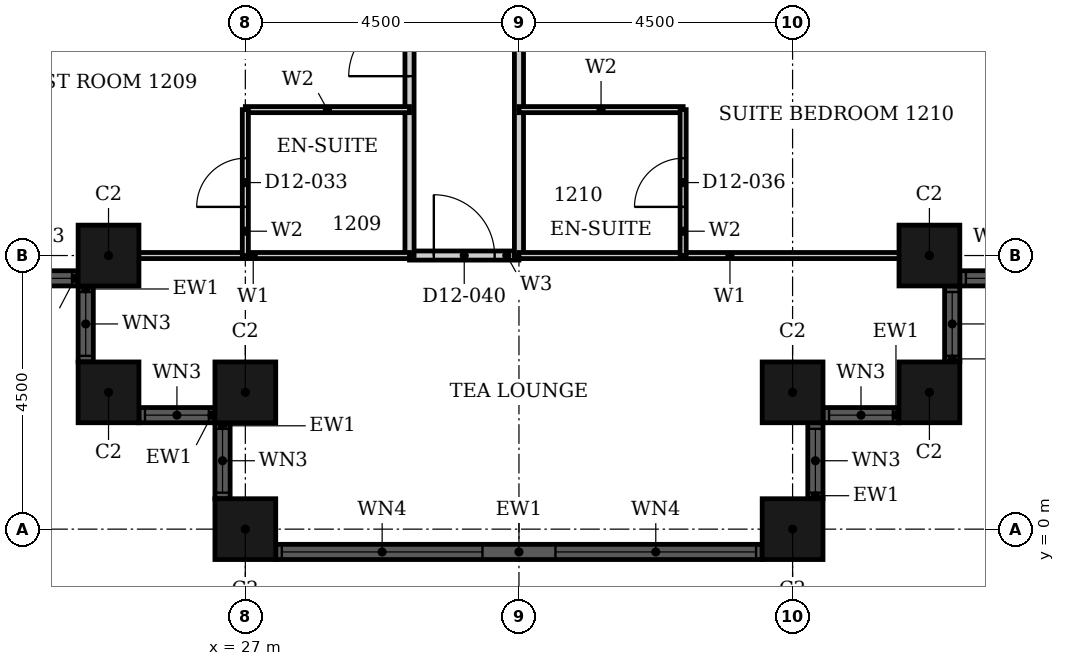
"""IFC4 building model, lengths in metres.
Left out: names, types, materials, properties, quantities, classifications, styles, units other than length and angle.
Written with IfcOpenShell. Run it as: python <this file> out.ifc"""

import sys

from ifc_helpers import new_model, si_unit, direction, frame, frame_2d, origin, origin_2d, place, context, subcontext, project, spatial, rectangle, hollow_rectangle, extrude, element, fill, save


model = new_model("IFC4")
c1 = context("Model", 3, precision=1e-05, world=origin(), true_north=direction((0.0, 1.0)))
c2 = subcontext(c1, "Body", "Model", "MODEL_VIEW")
j1 = project(units=[si_unit("LENGTHUNIT", "METRE"), si_unit("PLANEANGLEUNIT", "RADIAN")], contexts=[c1])
p1 = place(None, origin())
s1 = spatial("IfcSite", under=j1, at=p1, CompositionType="ELEMENT")
p2 = place(p1, origin())
s2 = spatial("IfcBuilding", under=s1, at=p2, CompositionType="ELEMENT")
p3 = place(p2, frame((0.0, 0.0, 56.4)))
s3 = spatial("IfcBuildingStorey", under=s2, at=p3, CompositionType="ELEMENT", Elevation=56.4)
for number, where, z_axis, x_axis in (
    (1, (24.75, 4.5, 0.0), (0.0, 0.0, 1.0), (1.0, 0.0, 0.0)),
    (2, (24.75, 2.25, 0.0), (0.0, 0.0, 1.0), (1.0, 0.0, 0.0)),
    (3, (27.0, 2.25, 0.0), (0.0, 0.0, 1.0), (1.0, 0.0, 0.0)),
    (4, (27.0, 0.0, 0.0), (0.0, 0.0, 1.0), (1.0, 0.0, 0.0)),
    (5, (36.0, 0.0, 0.0), (0.0, 0.0, 1.0), (1.0, 0.0, 0.0)),
    (6, (36.0, 2.25, 0.0), (0.0, 0.0, 1.0), (1.0, 0.0, 0.0)),
    (7, (38.25, 2.25, 0.0), (0.0, 0.0, 1.0), (1.0, 0.0, 0.0)),
    (8, (38.25, 4.5, 0.0), (0.0, 0.0, 1.0), (1.0, 0.0, 0.0)),
):
    element("IfcColumn", number, at=place(p3, frame(where, z_axis=z_axis, x_axis=x_axis)), inside=s3, PredefinedType="COLUMN", context=c2, shape_type="SweptSolid", body=[
        extrude(hollow_rectangle(XDim=1.0, YDim=1.0, WallThickness=0.032, at=origin_2d()), origin(), (0.0, 0.0, 1.0), 3.6),
    ])
p4 = place(p3, frame((23.0, 4.125, 0.0), z_axis=(0.0, 0.0, 1.0), x_axis=(1.0, 0.0, 0.0)))
e9 = element("IfcWall", 9, at=p4, inside=s3, PredefinedType="SOLIDWALL", context=c2, shape_type="SweptSolid", body=[
    extrude(rectangle(XDim=1.25, YDim=0.25, at=frame_2d((0.625, 0.0))), origin(), (0.0, 0.0, 1.0), 3.6),
])
p5 = place(p4, frame((0.1, 0.0, 0.9)))
e10 = element("IfcOpeningElement", 10, at=p5, cuts=e9, PredefinedType="OPENING", context=c2, shape_type="SweptSolid", body=[
    extrude(rectangle(XDim=1.05, YDim=2.08, at=frame_2d((0.525, 1.04))), frame((0.0, 0.135, 0.0), z_axis=(0.0, -1.0, 0.0), x_axis=(1.0, 0.0, 0.0)), (0.0, 0.0, 1.0), 0.27),
])
p6 = place(p3, frame((24.375, 4.0, 0.0), z_axis=(0.0, 0.0, 1.0), x_axis=(0.0, -1.0, 0.0)))
e11 = element("IfcWall", 11, at=p6, inside=s3, PredefinedType="SOLIDWALL", context=c2, shape_type="SweptSolid", body=[
    extrude(rectangle(XDim=1.25, YDim=0.25, at=frame_2d((0.625, 0.0))), origin(), (0.0, 0.0, 1.0), 3.6),
])
p7 = place(p6, frame((0.1, 0.0, 0.9)))
e12 = element("IfcOpeningElement", 12, at=p7, cuts=e11, PredefinedType="OPENING", context=c2, shape_type="SweptSolid", body=[
    extrude(rectangle(XDim=1.05, YDim=2.08, at=frame_2d((0.525, 1.04))), frame((0.0, 0.135, 0.0), z_axis=(0.0, -1.0, 0.0), x_axis=(1.0, 0.0, 0.0)), (0.0, 0.0, 1.0), 0.27),
])
p8 = place(p3, frame((25.25, 1.875, 0.0), z_axis=(0.0, 0.0, 1.0), x_axis=(1.0, 0.0, 0.0)))
e13 = element("IfcWall", 13, at=p8, inside=s3, PredefinedType="SOLIDWALL", context=c2, shape_type="SweptSolid", body=[
    extrude(rectangle(XDim=1.25, YDim=0.25, at=frame_2d((0.625, 0.0))), origin(), (0.0, 0.0, 1.0), 3.6),
])
p9 = place(p8, frame((0.1, 0.0, 0.9)))
e14 = element("IfcOpeningElement", 14, at=p9, cuts=e13, PredefinedType="OPENING", context=c2, shape_type="SweptSolid", body=[
    extrude(rectangle(XDim=1.05, YDim=2.08, at=frame_2d((0.525, 1.04))), frame((0.0, 0.135, 0.0), z_axis=(0.0, -1.0, 0.0), x_axis=(1.0, 0.0, 0.0)), (0.0, 0.0, 1.0), 0.27),
])
p10 = place(p3, frame((26.625, 1.75, 0.0), z_axis=(0.0, 0.0, 1.0), x_axis=(0.0, -1.0, 0.0)))
e15 = element("IfcWall", 15, at=p10, inside=s3, PredefinedType="SOLIDWALL", context=c2, shape_type="SweptSolid", body=[
    extrude(rectangle(XDim=1.25, YDim=0.25, at=frame_2d((0.625, 0.0))), origin(), (0.0, 0.0, 1.0), 3.6),
])
p11 = place(p10, frame((0.1, 0.0, 0.9)))
e16 = element("IfcOpeningElement", 16, at=p11, cuts=e15, PredefinedType="OPENING", context=c2, shape_type="SweptSolid", body=[
    extrude(rectangle(XDim=1.05, YDim=2.08, at=frame_2d((0.525, 1.04))), frame((0.0, 0.135, 0.0), z_axis=(0.0, -1.0, 0.0), x_axis=(1.0, 0.0, 0.0)), (0.0, 0.0, 1.0), 0.27),
])
p12 = place(p3, frame((27.5, -0.375, 0.0), z_axis=(0.0, 0.0, 1.0), x_axis=(1.0, 0.0, 0.0)))
e17 = element("IfcWall", 17, at=p12, inside=s3, PredefinedType="SOLIDWALL", context=c2, shape_type="SweptSolid", body=[
    extrude(rectangle(XDim=8.0, YDim=0.25, at=frame_2d((4.0, 0.0))), origin(), (0.0, 0.0, 1.0), 3.6),
])
p13 = place(p12, frame((0.1, 0.0, 0.9)))
e18 = element("IfcOpeningElement", 18, at=p13, cuts=e17, PredefinedType="OPENING", context=c2, shape_type="SweptSolid", body=[
    extrude(rectangle(XDim=3.3, YDim=2.08, at=frame_2d((1.65, 1.04))), frame((0.0, 0.135, 0.0), z_axis=(0.0, -1.0, 0.0), x_axis=(1.0, 0.0, 0.0)), (0.0, 0.0, 1.0), 0.27),
])
p14 = place(p12, frame((4.6, 0.0, 0.9)))
e19 = element("IfcOpeningElement", 19, at=p14, cuts=e17, PredefinedType="OPENING", context=c2, shape_type="SweptSolid", body=[
    extrude(rectangle(XDim=3.3, YDim=2.08, at=frame_2d((1.65, 1.04))), frame((0.0, 0.135, 0.0), z_axis=(0.0, -1.0, 0.0), x_axis=(1.0, 0.0, 0.0)), (0.0, 0.0, 1.0), 0.27),
])
p15 = place(p3, frame((36.375, 0.5, 0.0), z_axis=(0.0, 0.0, 1.0), x_axis=(0.0, 1.0, 0.0)))
e20 = element("IfcWall", 20, at=p15, inside=s3, PredefinedType="SOLIDWALL", context=c2, shape_type="SweptSolid", body=[
    extrude(rectangle(XDim=1.25, YDim=0.25, at=frame_2d((0.625, 0.0))), origin(), (0.0, 0.0, 1.0), 3.6),
])
p16 = place(p15, frame((0.1, 0.0, 0.9)))
e21 = element("IfcOpeningElement", 21, at=p16, cuts=e20, PredefinedType="OPENING", context=c2, shape_type="SweptSolid", body=[
    extrude(rectangle(XDim=1.05, YDim=2.08, at=frame_2d((0.525, 1.04))), frame((0.0, 0.135, 0.0), z_axis=(0.0, -1.0, 0.0), x_axis=(1.0, 0.0, 0.0)), (0.0, 0.0, 1.0), 0.27),
])
p17 = place(p3, frame((36.5, 1.875, 0.0), z_axis=(0.0, 0.0, 1.0), x_axis=(1.0, 0.0, 0.0)))
e22 = element("IfcWall", 22, at=p17, inside=s3, PredefinedType="SOLIDWALL", context=c2, shape_type="SweptSolid", body=[
    extrude(rectangle(XDim=1.25, YDim=0.25, at=frame_2d((0.625, 0.0))), origin(), (0.0, 0.0, 1.0), 3.6),
])
p18 = place(p17, frame((0.1, 0.0, 0.9)))
e23 = element("IfcOpeningElement", 23, at=p18, cuts=e22, PredefinedType="OPENING", context=c2, shape_type="SweptSolid", body=[
    extrude(rectangle(XDim=1.05, YDim=2.08, at=frame_2d((0.525, 1.04))), frame((0.0, 0.135, 0.0), z_axis=(0.0, -1.0, 0.0), x_axis=(1.0, 0.0, 0.0)), (0.0, 0.0, 1.0), 0.27),
])
p19 = place(p3, frame((38.625, 2.75, 0.0), z_axis=(0.0, 0.0, 1.0), x_axis=(0.0, 1.0, 0.0)))
e24 = element("IfcWall", 24, at=p19, inside=s3, PredefinedType="SOLIDWALL", context=c2, shape_type="SweptSolid", body=[
    extrude(rectangle(XDim=1.25, YDim=0.25, at=frame_2d((0.625, 0.0))), origin(), (0.0, 0.0, 1.0), 3.6),
])
p20 = place(p19, frame((0.1, 0.0, 0.9)))
e25 = element("IfcOpeningElement", 25, at=p20, cuts=e24, PredefinedType="OPENING", context=c2, shape_type="SweptSolid", body=[
    extrude(rectangle(XDim=1.05, YDim=2.08, at=frame_2d((0.525, 1.04))), frame((0.0, 0.135, 0.0), z_axis=(0.0, -1.0, 0.0), x_axis=(1.0, 0.0, 0.0)), (0.0, 0.0, 1.0), 0.27),
])
p21 = place(p3, frame((38.75, 4.125, 0.0), z_axis=(0.0, 0.0, 1.0), x_axis=(1.0, 0.0, 0.0)))
e26 = element("IfcWall", 26, at=p21, inside=s3, PredefinedType="SOLIDWALL", context=c2, shape_type="SweptSolid", body=[
    extrude(rectangle(XDim=1.25, YDim=0.25, at=frame_2d((0.625, 0.0))), origin(), (0.0, 0.0, 1.0), 3.6),
])
p22 = place(p21, frame((0.1, 0.0, 0.9)))
e27 = element("IfcOpeningElement", 27, at=p22, cuts=e26, PredefinedType="OPENING", context=c2, shape_type="SweptSolid", body=[
    extrude(rectangle(XDim=1.05, YDim=2.08, at=frame_2d((0.525, 1.04))), frame((0.0, 0.135, 0.0), z_axis=(0.0, -1.0, 0.0), x_axis=(1.0, 0.0, 0.0)), (0.0, 0.0, 1.0), 0.27),
])
p23 = place(p3, frame((29.7, 4.5, 0.0), z_axis=(0.0, 0.0, 1.0), x_axis=(1.0, 0.0, 0.0)))
e28 = element("IfcWall", 28, at=p23, inside=s3, PredefinedType="PARTITIONING", context=c2, shape_type="SweptSolid", body=[
    extrude(rectangle(XDim=1.8, YDim=0.15, at=frame_2d((0.9, 0.0))), origin(), (0.0, 0.0, 1.0), 3.3),
])
p24 = place(p23, frame((0.4, 0.0, 0.0)))
e29 = element("IfcOpeningElement", 29, at=p24, cuts=e28, PredefinedType="OPENING", context=c2, shape_type="SweptSolid", body=[
    extrude(rectangle(XDim=1.0, YDim=2.1, at=frame_2d((0.5, 1.05))), frame((0.0, 0.085, 0.0), z_axis=(0.0, -1.0, 0.0), x_axis=(1.0, 0.0, 0.0)), (0.0, 0.0, 1.0), 0.17),
])
p25 = place(p3, frame((29.7, 4.5, 0.0), z_axis=(0.0, 0.0, 1.0), x_axis=(0.0, 1.0, 0.0)))
e30 = element("IfcWall", 30, at=p25, inside=s3, PredefinedType="PARTITIONING", context=c2, shape_type="SweptSolid", body=[
    extrude(rectangle(XDim=16.2, YDim=0.15, at=frame_2d((8.1, 0.0))), origin(), (0.0, 0.0, 1.0), 3.3),
])
p26 = place(p25, frame((7.45, 0.0, 0.0)))
e31 = element("IfcOpeningElement", 31, at=p26, cuts=e30, PredefinedType="OPENING", context=c2, shape_type="SweptSolid", body=[
    extrude(rectangle(XDim=1.0, YDim=2.1, at=frame_2d((0.5, 1.05))), frame((0.0, 0.085, 0.0), z_axis=(0.0, -1.0, 0.0), x_axis=(1.0, 0.0, 0.0)), (0.0, 0.0, 1.0), 0.17),
])
p27 = place(p25, frame((2.95, 0.0, 0.0)))
e32 = element("IfcOpeningElement", 32, at=p27, cuts=e30, PredefinedType="OPENING", context=c2, shape_type="SweptSolid", body=[
    extrude(rectangle(XDim=1.0, YDim=2.1, at=frame_2d((0.5, 1.05))), frame((0.0, 0.085, 0.0), z_axis=(0.0, -1.0, 0.0), x_axis=(1.0, 0.0, 0.0)), (0.0, 0.0, 1.0), 0.17),
])
p28 = place(p3, frame((31.5, 4.5, 0.0), z_axis=(0.0, 0.0, 1.0), x_axis=(0.0, 1.0, 0.0)))
e33 = element("IfcWall", 33, at=p28, inside=s3, PredefinedType="PARTITIONING", context=c2, shape_type="SweptSolid", body=[
    extrude(rectangle(XDim=16.2, YDim=0.15, at=frame_2d((8.1, 0.0))), origin(), (0.0, 0.0, 1.0), 2.58),
])
p29 = place(p28, frame((6.25, 0.0, 0.0)))
e34 = element("IfcOpeningElement", 34, at=p29, cuts=e33, PredefinedType="OPENING", context=c2, shape_type="SweptSolid", body=[
    extrude(rectangle(XDim=1.0, YDim=2.1, at=frame_2d((0.5, 1.05))), frame((0.0, 0.085, 0.0), z_axis=(0.0, -1.0, 0.0), x_axis=(1.0, 0.0, 0.0)), (0.0, 0.0, 1.0), 0.17),
])
p30 = place(p3, frame((24.56, 4.5, 0.0), z_axis=(0.0, 0.0, 1.0), x_axis=(1.0, 0.0, 0.0)))
e35 = element("IfcWall", 35, at=p30, inside=s3, PredefinedType="PARTITIONING", context=c2, shape_type="SweptSolid", body=[
    extrude(rectangle(XDim=5.14, YDim=0.1, at=frame_2d((2.57, 0.0))), origin(), (0.0, 0.0, 1.0), 3.3),
])
p31 = place(p3, frame((31.5, 4.5, 0.0), z_axis=(0.0, 0.0, 1.0), x_axis=(1.0, 0.0, 0.0)))
e36 = element("IfcWall", 36, at=p31, inside=s3, PredefinedType="PARTITIONING", context=c2, shape_type="SweptSolid", body=[
    extrude(rectangle(XDim=6.94, YDim=0.1, at=frame_2d((3.47, 0.0))), origin(), (0.0, 0.0, 1.0), 3.3),
])
for number, where, z_axis, x_axis in (
    (37, (27.0, 6.9, 0.0), (0.0, 0.0, 1.0), (1.0, 0.0, 0.0)),
    (38, (31.5, 6.9, 0.0), (0.0, 0.0, 1.0), (1.0, 0.0, 0.0)),
):
    element("IfcWall", number, at=place(p3, frame(where, z_axis=z_axis, x_axis=x_axis)), inside=s3, PredefinedType="PARTITIONING", context=c2, shape_type="SweptSolid", body=[
        extrude(rectangle(XDim=2.7, YDim=0.1, at=frame_2d((1.35, 0.0))), origin(), (0.0, 0.0, 1.0), 3.3),
    ])
p32 = place(p3, frame((27.0, 4.5, 0.0), z_axis=(0.0, 0.0, 1.0), x_axis=(0.0, 1.0, 0.0)))
e39 = element("IfcWall", 39, at=p32, inside=s3, PredefinedType="PARTITIONING", context=c2, shape_type="SweptSolid", body=[
    extrude(rectangle(XDim=2.4, YDim=0.1, at=frame_2d((1.2, 0.0))), origin(), (0.0, 0.0, 1.0), 2.58),
])
p33 = place(p32, frame((0.8, 0.0, 0.0)))
e40 = element("IfcOpeningElement", 40, at=p33, cuts=e39, PredefinedType="OPENING", context=c2, shape_type="SweptSolid", body=[
    extrude(rectangle(XDim=0.8, YDim=2.1, at=frame_2d((0.4, 1.05))), frame((0.0, 0.06, 0.0), z_axis=(0.0, -1.0, 0.0), x_axis=(1.0, 0.0, 0.0)), (0.0, 0.0, 1.0), 0.12),
])
p34 = place(p3, frame((34.2, 4.5, 0.0), z_axis=(0.0, 0.0, 1.0), x_axis=(0.0, 1.0, 0.0)))
e41 = element("IfcWall", 41, at=p34, inside=s3, PredefinedType="PARTITIONING", context=c2, shape_type="SweptSolid", body=[
    extrude(rectangle(XDim=2.4, YDim=0.1, at=frame_2d((1.2, 0.0))), origin(), (0.0, 0.0, 1.0), 3.3),
])
p35 = place(p34, frame((0.8, 0.0, 0.0)))
e42 = element("IfcOpeningElement", 42, at=p35, cuts=e41, PredefinedType="OPENING", context=c2, shape_type="SweptSolid", body=[
    extrude(rectangle(XDim=0.8, YDim=2.1, at=frame_2d((0.4, 1.05))), frame((0.0, 0.06, 0.0), z_axis=(0.0, -1.0, 0.0), x_axis=(1.0, 0.0, 0.0)), (0.0, 0.0, 1.0), 0.12),
])
p36 = place(p5, origin())
e43 = element("IfcWindow", 43, at=p36, inside=s3, PartitioningType="SINGLE_PANEL", PredefinedType="WINDOW", context=c2, shape_type="SweptSolid", body=[
    extrude(rectangle(XDim=1.05, YDim=2.08, at=frame_2d((0.525, 1.04))), frame((0.0, 0.03, 0.0), z_axis=(0.0, -1.0, 0.0), x_axis=(1.0, 0.0, 0.0)), (0.0, 0.0, 1.0), 0.06),
])
fill(e10, e43)
p37 = place(p7, origin())
e44 = element("IfcWindow", 44, at=p37, inside=s3, PartitioningType="SINGLE_PANEL", PredefinedType="WINDOW", context=c2, shape_type="SweptSolid", body=[
    extrude(rectangle(XDim=1.05, YDim=2.08, at=frame_2d((0.525, 1.04))), frame((0.0, 0.03, 0.0), z_axis=(0.0, -1.0, 0.0), x_axis=(1.0, 0.0, 0.0)), (0.0, 0.0, 1.0), 0.06),
])
fill(e12, e44)
p38 = place(p9, origin())
e45 = element("IfcWindow", 45, at=p38, inside=s3, PartitioningType="SINGLE_PANEL", PredefinedType="WINDOW", context=c2, shape_type="SweptSolid", body=[
    extrude(rectangle(XDim=1.05, YDim=2.08, at=frame_2d((0.525, 1.04))), frame((0.0, 0.03, 0.0), z_axis=(0.0, -1.0, 0.0), x_axis=(1.0, 0.0, 0.0)), (0.0, 0.0, 1.0), 0.06),
])
fill(e14, e45)
p39 = place(p11, origin())
e46 = element("IfcWindow", 46, at=p39, inside=s3, PartitioningType="SINGLE_PANEL", PredefinedType="WINDOW", context=c2, shape_type="SweptSolid", body=[
    extrude(rectangle(XDim=1.05, YDim=2.08, at=frame_2d((0.525, 1.04))), frame((0.0, 0.03, 0.0), z_axis=(0.0, -1.0, 0.0), x_axis=(1.0, 0.0, 0.0)), (0.0, 0.0, 1.0), 0.06),
])
fill(e16, e46)
p40 = place(p13, origin())
e47 = element("IfcWindow", 47, at=p40, inside=s3, PartitioningType="SINGLE_PANEL", PredefinedType="WINDOW", context=c2, shape_type="SweptSolid", body=[
    extrude(rectangle(XDim=3.3, YDim=2.08, at=frame_2d((1.65, 1.04))), frame((0.0, 0.03, 0.0), z_axis=(0.0, -1.0, 0.0), x_axis=(1.0, 0.0, 0.0)), (0.0, 0.0, 1.0), 0.06),
])
fill(e18, e47)
p41 = place(p14, origin())
e48 = element("IfcWindow", 48, at=p41, inside=s3, PartitioningType="SINGLE_PANEL", PredefinedType="WINDOW", context=c2, shape_type="SweptSolid", body=[
    extrude(rectangle(XDim=3.3, YDim=2.08, at=frame_2d((1.65, 1.04))), frame((0.0, 0.03, 0.0), z_axis=(0.0, -1.0, 0.0), x_axis=(1.0, 0.0, 0.0)), (0.0, 0.0, 1.0), 0.06),
])
fill(e19, e48)
p42 = place(p16, origin())
e49 = element("IfcWindow", 49, at=p42, inside=s3, PartitioningType="SINGLE_PANEL", PredefinedType="WINDOW", context=c2, shape_type="SweptSolid", body=[
    extrude(rectangle(XDim=1.05, YDim=2.08, at=frame_2d((0.525, 1.04))), frame((0.0, 0.03, 0.0), z_axis=(0.0, -1.0, 0.0), x_axis=(1.0, 0.0, 0.0)), (0.0, 0.0, 1.0), 0.06),
])
fill(e21, e49)
p43 = place(p18, origin())
e50 = element("IfcWindow", 50, at=p43, inside=s3, PartitioningType="SINGLE_PANEL", PredefinedType="WINDOW", context=c2, shape_type="SweptSolid", body=[
    extrude(rectangle(XDim=1.05, YDim=2.08, at=frame_2d((0.525, 1.04))), frame((0.0, 0.03, 0.0), z_axis=(0.0, -1.0, 0.0), x_axis=(1.0, 0.0, 0.0)), (0.0, 0.0, 1.0), 0.06),
])
fill(e23, e50)
p44 = place(p20, origin())
e51 = element("IfcWindow", 51, at=p44, inside=s3, PartitioningType="SINGLE_PANEL", PredefinedType="WINDOW", context=c2, shape_type="SweptSolid", body=[
    extrude(rectangle(XDim=1.05, YDim=2.08, at=frame_2d((0.525, 1.04))), frame((0.0, 0.03, 0.0), z_axis=(0.0, -1.0, 0.0), x_axis=(1.0, 0.0, 0.0)), (0.0, 0.0, 1.0), 0.06),
])
fill(e25, e51)
p45 = place(p22, origin())
e52 = element("IfcWindow", 52, at=p45, inside=s3, PartitioningType="SINGLE_PANEL", PredefinedType="WINDOW", context=c2, shape_type="SweptSolid", body=[
    extrude(rectangle(XDim=1.05, YDim=2.08, at=frame_2d((0.525, 1.04))), frame((0.0, 0.03, 0.0), z_axis=(0.0, -1.0, 0.0), x_axis=(1.0, 0.0, 0.0)), (0.0, 0.0, 1.0), 0.06),
])
fill(e27, e52)
p46 = place(p27, origin())
e53 = element("IfcDoor", 53, at=p46, inside=s3, OperationType="SINGLE_SWING_RIGHT", PredefinedType="DOOR", context=c2, shape_type="SweptSolid", body=[
    extrude(rectangle(XDim=1.0, YDim=2.1, at=frame_2d((0.5, 1.05))), frame((0.0, 0.025, 0.0), z_axis=(0.0, -1.0, 0.0), x_axis=(1.0, 0.0, 0.0)), (0.0, 0.0, 1.0), 0.05),
])
fill(e32, e53)
p47 = place(p33, origin())
e54 = element("IfcDoor", 54, at=p47, inside=s3, OperationType="SINGLE_SWING_RIGHT", PredefinedType="DOOR", context=c2, shape_type="SweptSolid", body=[
    extrude(rectangle(XDim=0.8, YDim=2.1, at=frame_2d((0.4, 1.05))), frame((0.0, 0.025, 0.0), z_axis=(0.0, -1.0, 0.0), x_axis=(1.0, 0.0, 0.0)), (0.0, 0.0, 1.0), 0.05),
])
fill(e40, e54)
p48 = place(p35, origin())
e55 = element("IfcDoor", 55, at=p48, inside=s3, OperationType="SINGLE_SWING_RIGHT", PredefinedType="DOOR", context=c2, shape_type="SweptSolid", body=[
    extrude(rectangle(XDim=0.8, YDim=2.1, at=frame_2d((0.4, 1.05))), frame((0.0, 0.025, 0.0), z_axis=(0.0, -1.0, 0.0), x_axis=(1.0, 0.0, 0.0)), (0.0, 0.0, 1.0), 0.05),
])
fill(e42, e55)
p49 = place(p24, origin())
e56 = element("IfcDoor", 56, at=p49, inside=s3, OperationType="SINGLE_SWING_RIGHT", PredefinedType="DOOR", context=c2, shape_type="SweptSolid", body=[
    extrude(rectangle(XDim=1.0, YDim=2.1, at=frame_2d((0.5, 1.05))), frame((0.0, 0.025, 0.0), z_axis=(0.0, -1.0, 0.0), x_axis=(1.0, 0.0, 0.0)), (0.0, 0.0, 1.0), 0.05),
])
fill(e29, e56)
save(model, sys.argv[1])
